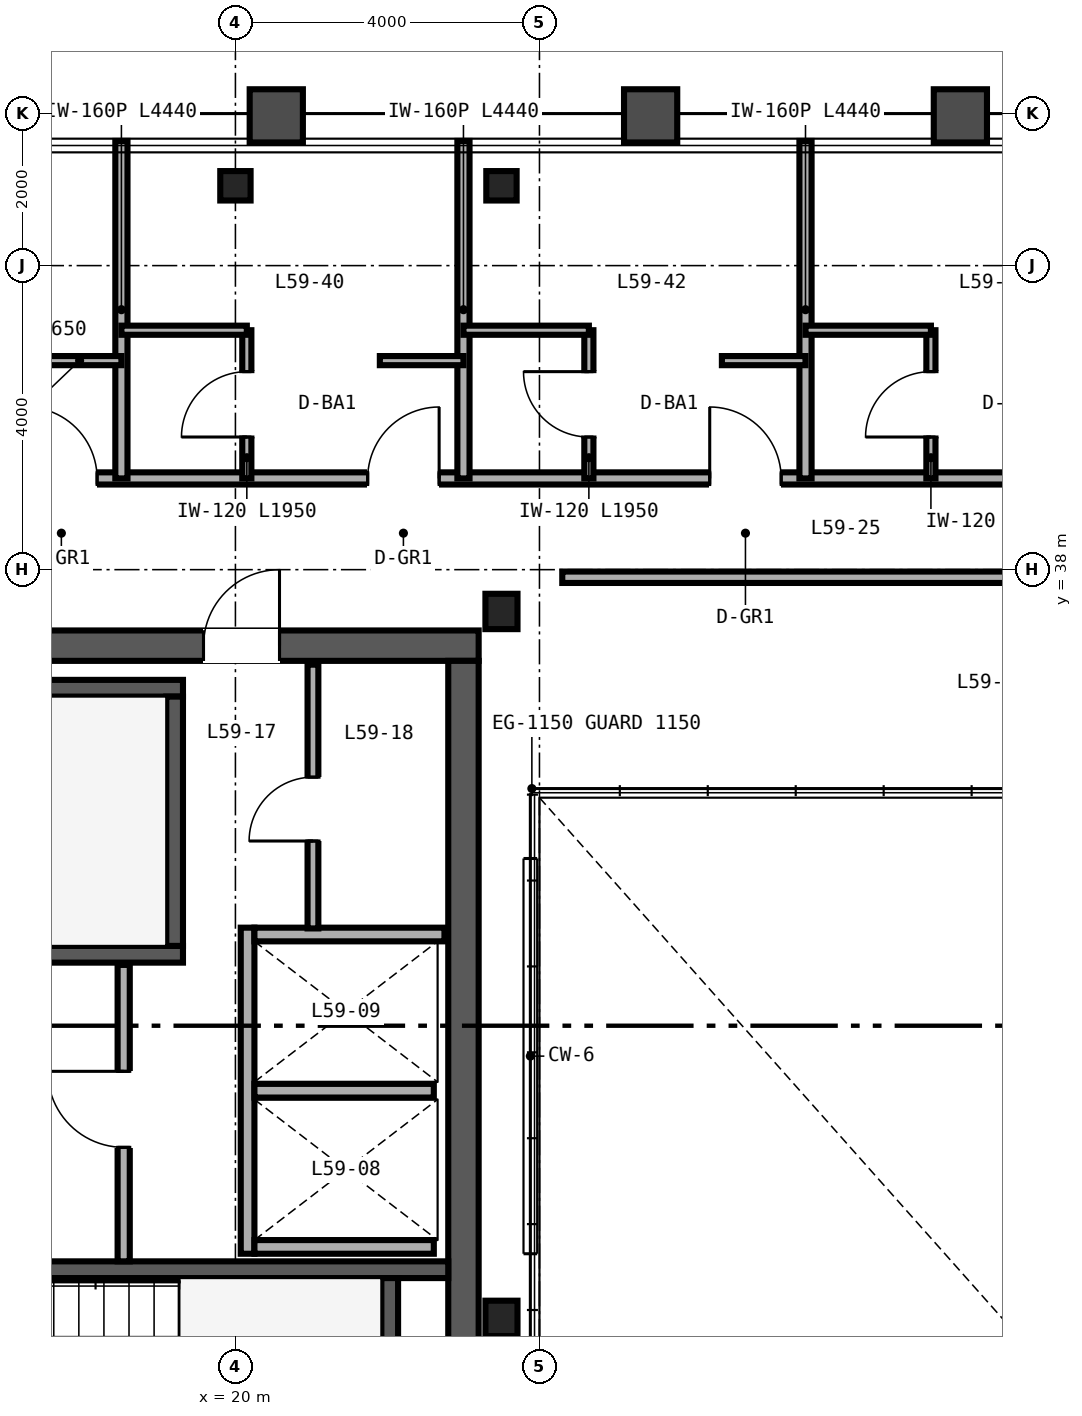
"""IFC4 building model, lengths in metres.
Left out: names, types, materials, properties, quantities, classifications, styles, units other than length and angle.
Written with IfcOpenShell. Run it as: python <this file> out.ifc"""

import sys

from ifc_helpers import new_model, si_unit, direction, frame, frame_2d, origin, origin_2d, place, context, subcontext, project, spatial, rectangle, i_section, extrude, source, transform, mapped, element, fill, save


model = new_model("IFC4")
c1 = context("Model", 3, precision=1e-05, world=origin(), true_north=direction((0.0, 1.0)))
c2 = subcontext(c1, "Body", "Model", "MODEL_VIEW")
j1 = project(units=[si_unit("LENGTHUNIT", "METRE"), si_unit("PLANEANGLEUNIT", "RADIAN")], contexts=[c1])
p1 = place(None, origin())
s1 = spatial("IfcSite", under=j1, at=p1, CompositionType="ELEMENT")
p2 = place(p1, origin())
s2 = spatial("IfcBuilding", under=s1, at=p2, CompositionType="ELEMENT")
p3 = place(p2, frame((0.0, 0.0, 236.4)))
s3 = spatial("IfcBuildingStorey", under=s2, at=p3, CompositionType="ELEMENT", Elevation=236.4)
p4 = place(p3, frame((10.8, 37.0, 0.0), z_axis=(0.0, 0.0, 1.0), x_axis=(1.0, 0.0, 0.0)))
e1 = element("IfcWall", 1, at=p4, inside=s3, PredefinedType="SHEAR", context=c2, shape_type="SweptSolid", body=[
    extrude(rectangle(XDim=12.4, YDim=0.4, at=frame_2d((6.2, 0.0))), origin(), (0.0, 0.0, 1.0), 3.38),
])
p5 = place(p4, frame((8.78, 0.0, 0.0)))
e2 = element("IfcOpeningElement", 2, at=p5, cuts=e1, PredefinedType="OPENING", context=c2, shape_type="SweptSolid", body=[
    extrude(rectangle(XDim=1.0, YDim=2.15, at=frame_2d((0.5, 1.075))), frame((0.0, 0.21, 0.0), z_axis=(0.0, -1.0, 0.0), x_axis=(1.0, 0.0, 0.0)), (0.0, 0.0, 1.0), 0.42),
])
p6 = place(p3, frame((23.0, 15.2, 0.0), z_axis=(0.0, 0.0, 1.0), x_axis=(0.0, 1.0, 0.0)))
e3 = element("IfcWall", 3, at=p6, inside=s3, PredefinedType="SHEAR", context=c2, shape_type="SweptSolid", body=[
    extrude(rectangle(XDim=21.6, YDim=0.4, at=frame_2d((10.8, 0.0))), origin(), (0.0, 0.0, 1.0), 3.38),
])
p7 = place(p3, frame((11.2, 32.94, 0.0), z_axis=(0.0, 0.0, 1.0), x_axis=(1.0, 0.0, 0.0)))
e4 = element("IfcWall", 4, at=p7, inside=s3, PredefinedType="SHEAR", context=c2, shape_type="SweptSolid", body=[
    extrude(rectangle(XDim=8.11, YDim=0.22, at=frame_2d((4.055, 0.0))), origin(), (0.0, 0.0, 1.0), 3.4),
])
p8 = place(p7, frame((0.72, 0.0, 0.0)))
e5 = element("IfcOpeningElement", 5, at=p8, cuts=e4, PredefinedType="OPENING", context=c2, shape_type="SweptSolid", body=[
    extrude(rectangle(XDim=1.05, YDim=2.15, at=frame_2d((0.525, 1.075))), frame((0.0, 0.12, 0.0), z_axis=(0.0, -1.0, 0.0), x_axis=(1.0, 0.0, 0.0)), (0.0, 0.0, 1.0), 0.24),
])
p9 = place(p3, frame((11.2, 36.44, 0.0), z_axis=(0.0, 0.0, 1.0), x_axis=(1.0, 0.0, 0.0)))
e6 = element("IfcWall", 6, at=p9, inside=s3, PredefinedType="SHEAR", context=c2, shape_type="SweptSolid", body=[
    extrude(rectangle(XDim=8.11, YDim=0.22, at=frame_2d((4.055, 0.0))), origin(), (0.0, 0.0, 1.0), 3.4),
])
p10 = place(p3, frame((19.2, 33.05, 0.0), z_axis=(0.0, 0.0, 1.0), x_axis=(0.0, 1.0, 0.0)))
e7 = element("IfcWall", 7, at=p10, inside=s3, PredefinedType="SHEAR", context=c2, shape_type="SweptSolid", body=[
    extrude(rectangle(XDim=3.28, YDim=0.22, at=frame_2d((1.64, 0.0))), origin(), (0.0, 0.0, 1.0), 3.4),
])
p11 = place(p3, frame((14.18, 28.79, 0.0), z_axis=(0.0, 0.0, 1.0), x_axis=(1.0, 0.0, 0.0)))
e8 = element("IfcWall", 8, at=p11, inside=s3, PredefinedType="SHEAR", context=c2, shape_type="SweptSolid", body=[
    extrude(rectangle(XDim=8.62, YDim=0.22, at=frame_2d((4.31, 0.0))), origin(), (0.0, 0.0, 1.0), 3.4),
])
p12 = place(p3, frame((22.03, 25.4, 0.0), z_axis=(0.0, 0.0, 1.0), x_axis=(0.0, 1.0, 0.0)))
e9 = element("IfcWall", 9, at=p12, inside=s3, PredefinedType="SHEAR", context=c2, shape_type="SweptSolid", body=[
    extrude(rectangle(XDim=3.28, YDim=0.22, at=frame_2d((1.64, 0.0))), origin(), (0.0, 0.0, 1.0), 3.4),
])
m1 = source(origin(), c2, "Body", "SweptSolid", [
    extrude(i_section(OverallWidth=0.422, OverallDepth=0.465, WebThickness=0.045, FlangeThickness=0.073, FilletRadius=0.025, at=origin_2d()), origin(), (0.0, 0.0, 1.0), 3.38),
])
for number, where, z_axis, x_axis in (
    (10, (23.5, 28.15, 0.0), (0.0, 0.0, 1.0), (1.0, 0.0, 0.0)),
    (11, (23.5, 37.45, 0.0), (0.0, 0.0, 1.0), (1.0, 0.0, 0.0)),
):
    element("IfcColumn", number, at=place(p3, frame(where, z_axis=z_axis, x_axis=x_axis)), inside=s3, PredefinedType="COLUMN", context=c2, shape_type="MappedRepresentation", body=[
        mapped(m1, transform((0.0, 0.0, 0.0), scale=1.0)),
    ])
m2 = source(origin(), c2, "Body", "SweptSolid", [
    extrude(i_section(OverallWidth=0.399, OverallDepth=0.387, WebThickness=0.021, FlangeThickness=0.033, FilletRadius=0.025, at=origin_2d()), origin(), (0.0, 0.0, 1.0), 3.38),
])
for number, where, z_axis, x_axis in (
    (12, (20.0, 43.05, 0.0), (0.0, 0.0, 1.0), (1.0, 0.0, 0.0)),
    (13, (23.5, 43.05, 0.0), (0.0, 0.0, 1.0), (1.0, 0.0, 0.0)),
):
    element("IfcColumn", number, at=place(p3, frame(where, z_axis=z_axis, x_axis=x_axis)), inside=s3, PredefinedType="COLUMN", context=c2, shape_type="MappedRepresentation", body=[
        mapped(m2, transform((0.0, 0.0, 0.0), scale=1.0)),
    ])
p13 = place(p3, frame((20.16, 29.0, 0.0), z_axis=(0.0, 0.0, 1.0), x_axis=(0.0, 1.0, 0.0)))
e14 = element("IfcWall", 14, at=p13, inside=s3, PredefinedType="SOLIDWALL", context=c2, shape_type="SweptSolid", body=[
    extrude(rectangle(XDim=4.29, YDim=0.18, at=frame_2d((2.145, 0.0))), origin(), (0.0, 0.0, 1.0), 3.38),
])
p14 = place(p3, frame((20.25, 29.09, 0.0), z_axis=(0.0, 0.0, 1.0), x_axis=(1.0, 0.0, 0.0)))
e15 = element("IfcWall", 15, at=p14, inside=s3, PredefinedType="SOLIDWALL", context=c2, shape_type="SweptSolid", body=[
    extrude(rectangle(XDim=2.36, YDim=0.18, at=frame_2d((1.18, 0.0))), origin(), (0.0, 0.0, 1.0), 3.38),
])
p15 = place(p3, frame((20.25, 33.2, 0.0), z_axis=(0.0, 0.0, 1.0), x_axis=(1.0, 0.0, 0.0)))
e16 = element("IfcWall", 16, at=p15, inside=s3, PredefinedType="SOLIDWALL", context=c2, shape_type="SweptSolid", body=[
    extrude(rectangle(XDim=2.5, YDim=0.18, at=frame_2d((1.25, 0.0))), origin(), (0.0, 0.0, 1.0), 3.38),
])
p16 = place(p3, frame((20.25, 31.145, 0.0), z_axis=(0.0, 0.0, 1.0), x_axis=(1.0, 0.0, 0.0)))
e17 = element("IfcWall", 17, at=p16, inside=s3, PredefinedType="SOLIDWALL", context=c2, shape_type="SweptSolid", body=[
    extrude(rectangle(XDim=2.36, YDim=0.18, at=frame_2d((1.18, 0.0))), origin(), (0.0, 0.0, 1.0), 3.38),
])
p17 = place(p3, frame((18.53, 28.9, 0.0), z_axis=(0.0, 0.0, 1.0), x_axis=(0.0, 1.0, 0.0)))
e18 = element("IfcWall", 18, at=p17, inside=s3, PredefinedType="PARTITIONING", context=c2, shape_type="SweptSolid", body=[
    extrude(rectangle(XDim=3.9, YDim=0.16, at=frame_2d((1.95, 0.0))), origin(), (0.0, 0.0, 1.0), 3.38),
])
p18 = place(p17, frame((1.5, 0.0, 0.0)))
e19 = element("IfcOpeningElement", 19, at=p18, cuts=e18, PredefinedType="OPENING", context=c2, shape_type="SweptSolid", body=[
    extrude(rectangle(XDim=1.0, YDim=2.15, at=frame_2d((0.5, 1.075))), frame((0.0, 0.09, 0.0), z_axis=(0.0, -1.0, 0.0), x_axis=(1.0, 0.0, 0.0)), (0.0, 0.0, 1.0), 0.18),
])
p19 = place(p3, frame((21.02, 33.28, 0.0), z_axis=(0.0, 0.0, 1.0), x_axis=(0.0, 1.0, 0.0)))
e20 = element("IfcWall", 20, at=p19, inside=s3, PredefinedType="PARTITIONING", context=c2, shape_type="SweptSolid", body=[
    extrude(rectangle(XDim=3.47, YDim=0.142, at=frame_2d((1.735, 0.0))), origin(), (0.0, 0.0, 1.0), 3.38),
])
p20 = place(p19, frame((1.15, 0.0, 0.0)))
e21 = element("IfcOpeningElement", 21, at=p20, cuts=e20, PredefinedType="OPENING", context=c2, shape_type="SweptSolid", body=[
    extrude(rectangle(XDim=0.84, YDim=2.1, at=frame_2d((0.42, 1.05))), frame((0.0, 0.081, 0.0), z_axis=(0.0, -1.0, 0.0), x_axis=(1.0, 0.0, 0.0)), (0.0, 0.0, 1.0), 0.162),
])
p21 = place(p3, frame((24.3, 37.9, 0.0), z_axis=(0.0, 0.0, 1.0), x_axis=(1.0, 0.0, 0.0)))
e22 = element("IfcWall", 22, at=p21, inside=s3, PredefinedType="PARTITIONING", context=c2, shape_type="SweptSolid", body=[
    extrude(rectangle(XDim=15.4, YDim=0.15, at=frame_2d((7.7, 0.0))), origin(), (0.0, 0.0, 1.0), 3.38),
])
p22 = place(p21, frame((7.0, 0.0, 0.0)))
e23 = element("IfcOpeningElement", 23, at=p22, cuts=e22, PredefinedType="OPENING", context=c2, shape_type="SweptSolid", body=[
    extrude(rectangle(XDim=0.96, YDim=2.15, at=frame_2d((0.48, 1.075))), frame((0.0, 0.085, 0.0), z_axis=(0.0, -1.0, 0.0), x_axis=(1.0, 0.0, 0.0)), (0.0, 0.0, 1.0), 0.17),
])
p23 = place(p3, frame((14.0, 39.2, 0.0), z_axis=(0.0, 0.0, 1.0), x_axis=(1.0, 0.0, 0.0)))
e24 = element("IfcWall", 24, at=p23, inside=s3, PredefinedType="PARTITIONING", context=c2, shape_type="SweptSolid", body=[
    extrude(rectangle(XDim=36.0, YDim=0.16, at=frame_2d((18.0, 0.0))), origin(), (0.0, 0.0, 1.0), 2.923),
])
p24 = place(p23, frame((3.24, 0.0, 0.0)))
e25 = element("IfcOpeningElement", 25, at=p24, cuts=e24, PredefinedType="OPENING", context=c2, shape_type="SweptSolid", body=[
    extrude(rectangle(XDim=0.94, YDim=2.15, at=frame_2d((0.47, 1.075))), frame((0.0, 0.09, 0.0), z_axis=(0.0, -1.0, 0.0), x_axis=(1.0, 0.0, 0.0)), (0.0, 0.0, 1.0), 0.18),
])
p25 = place(p23, frame((7.74, 0.0, 0.0)))
e26 = element("IfcOpeningElement", 26, at=p25, cuts=e24, PredefinedType="OPENING", context=c2, shape_type="SweptSolid", body=[
    extrude(rectangle(XDim=0.94, YDim=2.15, at=frame_2d((0.47, 1.075))), frame((0.0, 0.09, 0.0), z_axis=(0.0, -1.0, 0.0), x_axis=(1.0, 0.0, 0.0)), (0.0, 0.0, 1.0), 0.18),
])
p26 = place(p23, frame((12.24, 0.0, 0.0)))
e27 = element("IfcOpeningElement", 27, at=p26, cuts=e24, PredefinedType="OPENING", context=c2, shape_type="SweptSolid", body=[
    extrude(rectangle(XDim=0.94, YDim=2.15, at=frame_2d((0.47, 1.075))), frame((0.0, 0.09, 0.0), z_axis=(0.0, -1.0, 0.0), x_axis=(1.0, 0.0, 0.0)), (0.0, 0.0, 1.0), 0.18),
])
p27 = place(p23, frame((16.74, 0.0, 0.0)))
e28 = element("IfcOpeningElement", 28, at=p27, cuts=e24, PredefinedType="OPENING", context=c2, shape_type="SweptSolid", body=[
    extrude(rectangle(XDim=0.94, YDim=2.15, at=frame_2d((0.47, 1.075))), frame((0.0, 0.09, 0.0), z_axis=(0.0, -1.0, 0.0), x_axis=(1.0, 0.0, 0.0)), (0.0, 0.0, 1.0), 0.18),
])
p28 = place(p23, frame((21.24, 0.0, 0.0)))
e29 = element("IfcOpeningElement", 29, at=p28, cuts=e24, PredefinedType="OPENING", context=c2, shape_type="SweptSolid", body=[
    extrude(rectangle(XDim=0.94, YDim=2.15, at=frame_2d((0.47, 1.075))), frame((0.0, 0.09, 0.0), z_axis=(0.0, -1.0, 0.0), x_axis=(1.0, 0.0, 0.0)), (0.0, 0.0, 1.0), 0.18),
])
p29 = place(p23, frame((25.74, 0.0, 0.0)))
e30 = element("IfcOpeningElement", 30, at=p29, cuts=e24, PredefinedType="OPENING", context=c2, shape_type="SweptSolid", body=[
    extrude(rectangle(XDim=0.94, YDim=2.15, at=frame_2d((0.47, 1.075))), frame((0.0, 0.09, 0.0), z_axis=(0.0, -1.0, 0.0), x_axis=(1.0, 0.0, 0.0)), (0.0, 0.0, 1.0), 0.18),
])
p30 = place(p23, frame((30.24, 0.0, 0.0)))
e31 = element("IfcOpeningElement", 31, at=p30, cuts=e24, PredefinedType="OPENING", context=c2, shape_type="SweptSolid", body=[
    extrude(rectangle(XDim=0.94, YDim=2.15, at=frame_2d((0.47, 1.075))), frame((0.0, 0.09, 0.0), z_axis=(0.0, -1.0, 0.0), x_axis=(1.0, 0.0, 0.0)), (0.0, 0.0, 1.0), 0.18),
])
p31 = place(p23, frame((34.74, 0.0, 0.0)))
e32 = element("IfcOpeningElement", 32, at=p31, cuts=e24, PredefinedType="OPENING", context=c2, shape_type="SweptSolid", body=[
    extrude(rectangle(XDim=0.94, YDim=2.15, at=frame_2d((0.47, 1.075))), frame((0.0, 0.09, 0.0), z_axis=(0.0, -1.0, 0.0), x_axis=(1.0, 0.0, 0.0)), (0.0, 0.0, 1.0), 0.18),
])
p32 = place(p3, frame((18.5, 39.2, 0.0), z_axis=(0.0, 0.0, 1.0), x_axis=(0.0, 1.0, 0.0)))
e33 = element("IfcWall", 33, at=p32, inside=s3, PredefinedType="PARTITIONING", context=c2, shape_type="SweptSolid", body=[
    extrude(rectangle(XDim=4.44, YDim=0.16, at=frame_2d((2.22, 0.0))), origin(), (0.0, 0.0, 1.0), 2.687),
])
p33 = place(p3, frame((17.4, 40.75, 0.0), z_axis=(0.0, 0.0, 1.0), x_axis=(1.0, 0.0, 0.0)))
e34 = element("IfcWall", 34, at=p33, inside=s3, PredefinedType="PARTITIONING", context=c2, shape_type="SweptSolid", body=[
    extrude(rectangle(XDim=1.1, YDim=0.12, at=frame_2d((0.55, 0.0))), origin(), (0.0, 0.0, 1.0), 3.38),
])
p34 = place(p3, frame((23.0, 39.2, 0.0), z_axis=(0.0, 0.0, 1.0), x_axis=(0.0, 1.0, 0.0)))
e35 = element("IfcWall", 35, at=p34, inside=s3, PredefinedType="PARTITIONING", context=c2, shape_type="SweptSolid", body=[
    extrude(rectangle(XDim=4.44, YDim=0.16, at=frame_2d((2.22, 0.0))), origin(), (0.0, 0.0, 1.0), 2.843),
])
p35 = place(p3, frame((20.15, 39.2, 0.0), z_axis=(0.0, 0.0, 1.0), x_axis=(0.0, 1.0, 0.0)))
e36 = element("IfcWall", 36, at=p35, inside=s3, PredefinedType="PARTITIONING", context=c2, shape_type="SweptSolid", body=[
    extrude(rectangle(XDim=1.95, YDim=0.12, at=frame_2d((0.975, 0.0))), origin(), (0.0, 0.0, 1.0), 3.38),
])
p36 = place(p35, frame((0.545, 0.0, 0.0)))
e37 = element("IfcOpeningElement", 37, at=p36, cuts=e36, PredefinedType="OPENING", context=c2, shape_type="SweptSolid", body=[
    extrude(rectangle(XDim=0.86, YDim=2.1, at=frame_2d((0.43, 1.05))), frame((0.0, 0.07, 0.0), z_axis=(0.0, -1.0, 0.0), x_axis=(1.0, 0.0, 0.0)), (0.0, 0.0, 1.0), 0.14),
])
p37 = place(p3, frame((18.5, 41.15, 0.0), z_axis=(0.0, 0.0, 1.0), x_axis=(1.0, 0.0, 0.0)))
e38 = element("IfcWall", 38, at=p37, inside=s3, PredefinedType="PARTITIONING", context=c2, shape_type="SweptSolid", body=[
    extrude(rectangle(XDim=1.65, YDim=0.12, at=frame_2d((0.825, 0.0))), origin(), (0.0, 0.0, 1.0), 3.38),
])
p38 = place(p3, frame((21.9, 40.75, 0.0), z_axis=(0.0, 0.0, 1.0), x_axis=(1.0, 0.0, 0.0)))
e39 = element("IfcWall", 39, at=p38, inside=s3, PredefinedType="PARTITIONING", context=c2, shape_type="SweptSolid", body=[
    extrude(rectangle(XDim=1.1, YDim=0.12, at=frame_2d((0.55, 0.0))), origin(), (0.0, 0.0, 1.0), 3.38),
])
p39 = place(p3, frame((27.5, 39.2, 0.0), z_axis=(0.0, 0.0, 1.0), x_axis=(0.0, 1.0, 0.0)))
e40 = element("IfcWall", 40, at=p39, inside=s3, PredefinedType="PARTITIONING", context=c2, shape_type="SweptSolid", body=[
    extrude(rectangle(XDim=4.44, YDim=0.16, at=frame_2d((2.22, 0.0))), origin(), (0.0, 0.0, 1.0), 2.453),
])
p40 = place(p3, frame((24.65, 39.2, 0.0), z_axis=(0.0, 0.0, 1.0), x_axis=(0.0, 1.0, 0.0)))
e41 = element("IfcWall", 41, at=p40, inside=s3, PredefinedType="PARTITIONING", context=c2, shape_type="SweptSolid", body=[
    extrude(rectangle(XDim=1.95, YDim=0.12, at=frame_2d((0.975, 0.0))), origin(), (0.0, 0.0, 1.0), 3.38),
])
p41 = place(p40, frame((0.545, 0.0, 0.0)))
e42 = element("IfcOpeningElement", 42, at=p41, cuts=e41, PredefinedType="OPENING", context=c2, shape_type="SweptSolid", body=[
    extrude(rectangle(XDim=0.86, YDim=2.1, at=frame_2d((0.43, 1.05))), frame((0.0, 0.07, 0.0), z_axis=(0.0, -1.0, 0.0), x_axis=(1.0, 0.0, 0.0)), (0.0, 0.0, 1.0), 0.14),
])
p42 = place(p3, frame((23.0, 41.15, 0.0), z_axis=(0.0, 0.0, 1.0), x_axis=(1.0, 0.0, 0.0)))
e43 = element("IfcWall", 43, at=p42, inside=s3, PredefinedType="PARTITIONING", context=c2, shape_type="SweptSolid", body=[
    extrude(rectangle(XDim=1.65, YDim=0.12, at=frame_2d((0.825, 0.0))), origin(), (0.0, 0.0, 1.0), 2.923),
])
p43 = place(p3, frame((26.4, 40.75, 0.0), z_axis=(0.0, 0.0, 1.0), x_axis=(1.0, 0.0, 0.0)))
e44 = element("IfcWall", 44, at=p43, inside=s3, PredefinedType="PARTITIONING", context=c2, shape_type="SweptSolid", body=[
    extrude(rectangle(XDim=1.1, YDim=0.12, at=frame_2d((0.55, 0.0))), origin(), (0.0, 0.0, 1.0), 3.38),
])
p44 = place(p3, frame((29.15, 39.2, 0.0), z_axis=(0.0, 0.0, 1.0), x_axis=(0.0, 1.0, 0.0)))
e45 = element("IfcWall", 45, at=p44, inside=s3, PredefinedType="PARTITIONING", context=c2, shape_type="SweptSolid", body=[
    extrude(rectangle(XDim=1.95, YDim=0.12, at=frame_2d((0.975, 0.0))), origin(), (0.0, 0.0, 1.0), 3.38),
])
p45 = place(p44, frame((0.545, 0.0, 0.0)))
e46 = element("IfcOpeningElement", 46, at=p45, cuts=e45, PredefinedType="OPENING", context=c2, shape_type="SweptSolid", body=[
    extrude(rectangle(XDim=0.86, YDim=2.1, at=frame_2d((0.43, 1.05))), frame((0.0, 0.07, 0.0), z_axis=(0.0, -1.0, 0.0), x_axis=(1.0, 0.0, 0.0)), (0.0, 0.0, 1.0), 0.14),
])
p46 = place(p3, frame((27.5, 41.15, 0.0), z_axis=(0.0, 0.0, 1.0), x_axis=(1.0, 0.0, 0.0)))
e47 = element("IfcWall", 47, at=p46, inside=s3, PredefinedType="PARTITIONING", context=c2, shape_type="SweptSolid", body=[
    extrude(rectangle(XDim=1.65, YDim=0.12, at=frame_2d((0.825, 0.0))), origin(), (0.0, 0.0, 1.0), 3.38),
])
m3 = source(origin(), c2, "Body", "SweptSolid", [
    extrude(rectangle(XDim=1.0, YDim=2.15, at=frame_2d((0.5, 1.075))), frame((0.0, 0.025, 0.0), z_axis=(0.0, -1.0, 0.0), x_axis=(1.0, 0.0, 0.0)), (0.0, 0.0, 1.0), 0.05),
])
p47 = place(p18, origin())
e48 = element("IfcDoor", 48, at=p47, inside=s3, OperationType="SINGLE_SWING_RIGHT", PredefinedType="DOOR", context=c2, shape_type="MappedRepresentation", body=[
    mapped(m3, transform((0.0, 0.0, 0.0), scale=1.0)),
])
fill(e19, e48)
m4 = source(origin(), c2, "Body", "SweptSolid", [
    extrude(rectangle(XDim=0.84, YDim=2.1, at=frame_2d((0.42, 1.05))), frame((0.0, 0.025, 0.0), z_axis=(0.0, -1.0, 0.0), x_axis=(1.0, 0.0, 0.0)), (0.0, 0.0, 1.0), 0.05),
])
p48 = place(p20, origin())
e49 = element("IfcDoor", 49, at=p48, inside=s3, OperationType="SINGLE_SWING_LEFT", PredefinedType="DOOR", context=c2, shape_type="MappedRepresentation", body=[
    mapped(m4, transform((0.0, 0.0, 0.0), scale=1.0)),
])
fill(e21, e49)
p49 = place(p5, origin())
e50 = element("IfcDoor", 50, at=p49, inside=s3, OperationType="SINGLE_SWING_RIGHT", PredefinedType="DOOR", context=c2, shape_type="MappedRepresentation", body=[
    mapped(m3, transform((0.0, 0.0, 0.0), scale=1.0)),
])
fill(e2, e50)
m5 = source(origin(), c2, "Body", "SweptSolid", [
    extrude(rectangle(XDim=0.86, YDim=2.1, at=frame_2d((0.43, 1.05))), frame((0.0, 0.025, 0.0), z_axis=(0.0, -1.0, 0.0), x_axis=(1.0, 0.0, 0.0)), (0.0, 0.0, 1.0), 0.05),
])
p50 = place(p36, origin())
e51 = element("IfcDoor", 51, at=p50, inside=s3, OperationType="SINGLE_SWING_LEFT", PredefinedType="DOOR", context=c2, shape_type="MappedRepresentation", body=[
    mapped(m5, transform((0.0, 0.0, 0.0), scale=1.0)),
])
fill(e37, e51)
p51 = place(p41, origin())
e52 = element("IfcDoor", 52, at=p51, inside=s3, OperationType="SINGLE_SWING_RIGHT", PredefinedType="DOOR", context=c2, shape_type="MappedRepresentation", body=[
    mapped(m5, transform((0.0, 0.0, 0.0), scale=1.0)),
])
fill(e42, e52)
p52 = place(p45, origin())
e53 = element("IfcDoor", 53, at=p52, inside=s3, OperationType="SINGLE_SWING_LEFT", PredefinedType="DOOR", context=c2, shape_type="MappedRepresentation", body=[
    mapped(m5, transform((0.0, 0.0, 0.0), scale=1.0)),
])
fill(e46, e53)
m6 = source(origin(), c2, "Body", "SweptSolid", [
    extrude(rectangle(XDim=0.94, YDim=2.15, at=frame_2d((0.47, 1.075))), frame((0.0, 0.025, 0.0), z_axis=(0.0, -1.0, 0.0), x_axis=(1.0, 0.0, 0.0)), (0.0, 0.0, 1.0), 0.05),
])
p53 = place(p24, origin())
e54 = element("IfcDoor", 54, at=p53, inside=s3, OperationType="SINGLE_SWING_LEFT", PredefinedType="DOOR", context=c2, shape_type="MappedRepresentation", body=[
    mapped(m6, transform((0.0, 0.0, 0.0), scale=1.0)),
])
fill(e25, e54)
p54 = place(p25, origin())
e55 = element("IfcDoor", 55, at=p54, inside=s3, OperationType="SINGLE_SWING_RIGHT", PredefinedType="DOOR", context=c2, shape_type="MappedRepresentation", body=[
    mapped(m6, transform((0.0, 0.0, 0.0), scale=1.0)),
])
fill(e26, e55)
p55 = place(p26, origin())
e56 = element("IfcDoor", 56, at=p55, inside=s3, OperationType="SINGLE_SWING_LEFT", PredefinedType="DOOR", context=c2, shape_type="MappedRepresentation", body=[
    mapped(m6, transform((0.0, 0.0, 0.0), scale=1.0)),
])
fill(e27, e56)
save(model, sys.argv[1])
